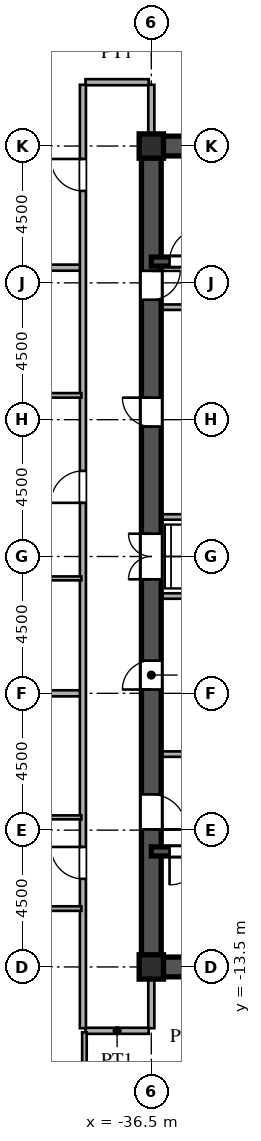
"""IFC4 building model, lengths in metres.
Left out: names, types, materials, properties, quantities, classifications, styles, units other than length and angle.
Written with IfcOpenShell. Run it as: python <this file> out.ifc"""

import sys

from ifc_helpers import new_model, si_unit, direction, frame, frame_2d, origin, origin_2d, place, context, subcontext, project, spatial, rectangle, i_section, extrude, source, transform, mapped, element, fill, save


model = new_model("IFC4")
c1 = context("Model", 3, precision=1e-05, world=origin(), true_north=direction((0.0, 1.0)))
c2 = subcontext(c1, "Body", "Model", "MODEL_VIEW")
j1 = project(units=[si_unit("LENGTHUNIT", "METRE"), si_unit("PLANEANGLEUNIT", "RADIAN")], contexts=[c1])
p1 = place(None, origin())
s1 = spatial("IfcSite", under=j1, at=p1, CompositionType="ELEMENT")
p2 = place(p1, origin())
s2 = spatial("IfcBuilding", under=s1, at=p2, CompositionType="ELEMENT")
p3 = place(p2, frame((0.0, 0.0, 65.7)))
s3 = spatial("IfcBuildingStorey", under=s2, at=p3, CompositionType="ELEMENT", Elevation=65.7)
m1 = source(origin(), c2, "Body", "SweptSolid", [
    extrude(i_section(OverallWidth=0.8, OverallDepth=0.8, WebThickness=0.032, FlangeThickness=0.05, at=origin_2d()), origin(), (0.0, 0.0, 1.0), 3.6),
])
for number, where, z_axis, x_axis in (
    (1, (-36.5, -13.5, 0.0), (0.0, 0.0, 1.0), (1.0, 0.0, 0.0)),
    (2, (-36.5, 13.5, 0.0), (0.0, 0.0, 1.0), (1.0, 0.0, 0.0)),
):
    element("IfcColumn", number, at=place(p3, frame(where, z_axis=z_axis, x_axis=x_axis)), inside=s3, PredefinedType="COLUMN", context=c2, shape_type="MappedRepresentation", body=[
        mapped(m1, transform((0.0, 0.0, 0.0), scale=1.0)),
    ])
for number, where, z_axis, x_axis in (
    (3, (-36.5, -13.5, 0.0), (0.0, 0.0, 1.0), (1.0, 0.0, 0.0)),
    (4, (-36.5, 13.5, 0.0), (0.0, 0.0, 1.0), (1.0, 0.0, 0.0)),
):
    element("IfcWall", number, at=place(p3, frame(where, z_axis=z_axis, x_axis=x_axis)), inside=s3, PredefinedType="SHEAR", context=c2, shape_type="SweptSolid", body=[
        extrude(rectangle(XDim=9.0, YDim=0.65, at=frame_2d((4.5, 0.0))), origin(), (0.0, 0.0, 1.0), 3.38),
    ])
p4 = place(p3, frame((-36.5, -13.65, 0.0), z_axis=(0.0, 0.0, 1.0), x_axis=(0.0, 1.0, 0.0)))
e5 = element("IfcWall", 5, at=p4, inside=s3, PredefinedType="SHEAR", context=c2, shape_type="SweptSolid", body=[
    extrude(rectangle(XDim=7.15, YDim=0.65, at=frame_2d((3.575, 0.0))), origin(), (0.0, 0.0, 1.0), 3.38),
])
p5 = place(p4, frame((4.675, 0.0, 0.0)))
e6 = element("IfcOpeningElement", 6, at=p5, cuts=e5, PredefinedType="OPENING", context=c2, shape_type="SweptSolid", body=[
    extrude(rectangle(XDim=1.15, YDim=2.2, at=frame_2d((0.575, 1.1))), frame((0.0, 0.335, 0.0), z_axis=(0.0, -1.0, 0.0), x_axis=(1.0, 0.0, 0.0)), (0.0, 0.0, 1.0), 0.67),
])
p6 = place(p3, frame((-36.5, -1.3, 0.0), z_axis=(0.0, 0.0, 1.0), x_axis=(0.0, 1.0, 0.0)))
e7 = element("IfcWall", 7, at=p6, inside=s3, PredefinedType="SHEAR", context=c2, shape_type="SweptSolid", body=[
    extrude(rectangle(XDim=2.6, YDim=0.65, at=frame_2d((1.3, 0.0))), origin(), (0.0, 0.0, 1.0), 3.38),
])
p7 = place(p6, frame((0.55, 0.0, 0.0)))
e8 = element("IfcOpeningElement", 8, at=p7, cuts=e7, PredefinedType="OPENING", context=c2, shape_type="SweptSolid", body=[
    extrude(rectangle(XDim=1.5, YDim=2.3, at=frame_2d((0.75, 1.15))), frame((0.0, 0.335, 0.0), z_axis=(0.0, -1.0, 0.0), x_axis=(1.0, 0.0, 0.0)), (0.0, 0.0, 1.0), 0.67),
])
p8 = place(p3, frame((-36.5, 8.2, 0.0), z_axis=(0.0, 0.0, 1.0), x_axis=(0.0, 1.0, 0.0)))
e9 = element("IfcWall", 9, at=p8, inside=s3, PredefinedType="SHEAR", context=c2, shape_type="SweptSolid", body=[
    extrude(rectangle(XDim=5.45, YDim=0.65, at=frame_2d((2.725, 0.0))), origin(), (0.0, 0.0, 1.0), 3.38),
])
p9 = place(p8, frame((0.245, 0.0, 0.0)))
e10 = element("IfcOpeningElement", 10, at=p9, cuts=e9, PredefinedType="OPENING", context=c2, shape_type="SweptSolid", body=[
    extrude(rectangle(XDim=0.95, YDim=2.15, at=frame_2d((0.475, 1.075))), frame((0.0, 0.335, 0.0), z_axis=(0.0, -1.0, 0.0), x_axis=(1.0, 0.0, 0.0)), (0.0, 0.0, 1.0), 0.67),
])
p10 = place(p3, frame((-36.5, -6.5, 0.0), z_axis=(0.0, 0.0, 1.0), x_axis=(0.0, 1.0, 0.0)))
e11 = element("IfcWall", 11, at=p10, inside=s3, PredefinedType="SHEAR", context=c2, shape_type="SweptSolid", body=[
    extrude(rectangle(XDim=5.2, YDim=0.65, at=frame_2d((2.6, 0.0))), origin(), (0.0, 0.0, 1.0), 3.38),
])
p11 = place(p10, frame((2.125, 0.0, 0.0)))
e12 = element("IfcOpeningElement", 12, at=p11, cuts=e11, PredefinedType="OPENING", context=c2, shape_type="SweptSolid", body=[
    extrude(rectangle(XDim=0.95, YDim=2.15, at=frame_2d((0.475, 1.075))), frame((0.0, 0.335, 0.0), z_axis=(0.0, -1.0, 0.0), x_axis=(1.0, 0.0, 0.0)), (0.0, 0.0, 1.0), 0.67),
])
p12 = place(p3, frame((-36.5, 1.3, 0.0), z_axis=(0.0, 0.0, 1.0), x_axis=(0.0, 1.0, 0.0)))
e13 = element("IfcWall", 13, at=p12, inside=s3, PredefinedType="SHEAR", context=c2, shape_type="SweptSolid", body=[
    extrude(rectangle(XDim=6.9, YDim=0.65, at=frame_2d((3.45, 0.0))), origin(), (0.0, 0.0, 1.0), 3.38),
])
p13 = place(p12, frame((2.975, 0.0, 0.0)))
e14 = element("IfcOpeningElement", 14, at=p13, cuts=e13, PredefinedType="OPENING", context=c2, shape_type="SweptSolid", body=[
    extrude(rectangle(XDim=0.95, YDim=2.15, at=frame_2d((0.475, 1.075))), frame((0.0, 0.335, 0.0), z_axis=(0.0, -1.0, 0.0), x_axis=(1.0, 0.0, 0.0)), (0.0, 0.0, 1.0), 0.67),
])
p14 = place(p3, frame((-36.5, -9.7, 0.0), z_axis=(0.0, 0.0, 1.0), x_axis=(1.0, 0.0, 0.0)))
e15 = element("IfcWall", 15, at=p14, inside=s3, PredefinedType="SHEAR", context=c2, shape_type="SweptSolid", body=[
    extrude(rectangle(XDim=9.0, YDim=0.3, at=frame_2d((4.5, 0.0))), origin(), (0.0, 0.0, 1.0), 3.38),
])
p15 = place(p14, frame((0.6, 0.0, 0.0)))
e16 = element("IfcOpeningElement", 16, at=p15, cuts=e15, PredefinedType="OPENING", context=c2, shape_type="SweptSolid", body=[
    extrude(rectangle(XDim=1.1, YDim=2.2, at=frame_2d((0.55, 1.1))), frame((0.0, 0.16, 0.0), z_axis=(0.0, -1.0, 0.0), x_axis=(1.0, 0.0, 0.0)), (0.0, 0.0, 1.0), 0.32),
])
p16 = place(p3, frame((-36.5, 9.7, 0.0), z_axis=(0.0, 0.0, 1.0), x_axis=(1.0, 0.0, 0.0)))
e17 = element("IfcWall", 17, at=p16, inside=s3, PredefinedType="SHEAR", context=c2, shape_type="SweptSolid", body=[
    extrude(rectangle(XDim=9.0, YDim=0.3, at=frame_2d((4.5, 0.0))), origin(), (0.0, 0.0, 1.0), 3.38),
])
p17 = place(p16, frame((0.6, 0.0, 0.0)))
e18 = element("IfcOpeningElement", 18, at=p17, cuts=e17, PredefinedType="OPENING", context=c2, shape_type="SweptSolid", body=[
    extrude(rectangle(XDim=1.1, YDim=2.2, at=frame_2d((0.55, 1.1))), frame((0.0, 0.16, 0.0), z_axis=(0.0, -1.0, 0.0), x_axis=(1.0, 0.0, 0.0)), (0.0, 0.0, 1.0), 0.32),
])
for number, where, z_axis, x_axis in (
    (19, (-36.15, -6.5, 0.0), (0.0, 0.0, 1.0), (1.0, 0.0, 0.0)),
    (20, (-36.15, 8.2, 0.0), (0.0, 0.0, 1.0), (1.0, 0.0, 0.0)),
):
    element("IfcWall", number, at=place(p3, frame(where, z_axis=z_axis, x_axis=x_axis)), inside=s3, PredefinedType="PARTITIONING", context=c2, shape_type="SweptSolid", body=[
        extrude(rectangle(XDim=5.7, YDim=0.18, at=frame_2d((2.85, 0.0))), origin(), (0.0, 0.0, 1.0), 3.38),
    ])
for number, where, z_axis, x_axis in (
    (21, (-36.15, -1.3, 0.0), (0.0, 0.0, 1.0), (1.0, 0.0, 0.0)),
    (22, (-36.15, 1.3, 0.0), (0.0, 0.0, 1.0), (1.0, 0.0, 0.0)),
):
    element("IfcWall", number, at=place(p3, frame(where, z_axis=z_axis, x_axis=x_axis)), inside=s3, PredefinedType="PARTITIONING", context=c2, shape_type="SweptSolid", body=[
        extrude(rectangle(XDim=2.95, YDim=0.18, at=frame_2d((1.475, 0.0))), origin(), (0.0, 0.0, 1.0), 3.38),
    ])
p18 = place(p3, frame((-38.665, -15.6, 0.0), z_axis=(0.0, 0.0, 1.0), x_axis=(1.0, 0.0, 0.0)))
e23 = element("IfcWall", 23, at=p18, inside=s3, PredefinedType="PARTITIONING", context=c2, shape_type="SweptSolid", body=[
    extrude(rectangle(XDim=2.08, YDim=0.2, at=frame_2d((1.04, 0.0))), origin(), (0.0, 0.0, 1.0), 3.38),
])
p19 = place(p3, frame((-43.8, -11.58, 0.0), z_axis=(0.0, 0.0, 1.0), x_axis=(1.0, 0.0, 0.0)))
e24 = element("IfcWall", 24, at=p19, inside=s3, PredefinedType="PARTITIONING", context=c2, shape_type="SweptSolid", body=[
    extrude(rectangle(XDim=5.0, YDim=0.15, at=frame_2d((2.5, 0.0))), origin(), (0.0, 0.0, 1.0), 3.38),
])
p20 = place(p19, frame((2.025, 0.0, 0.0)))
e25 = element("IfcOpeningElement", 25, at=p20, cuts=e24, PredefinedType="OPENING", context=c2, shape_type="SweptSolid", body=[
    extrude(rectangle(XDim=0.95, YDim=2.15, at=frame_2d((0.475, 1.075))), frame((0.0, 0.085, 0.0), z_axis=(0.0, -1.0, 0.0), x_axis=(1.0, 0.0, 0.0)), (0.0, 0.0, 1.0), 0.17),
])
p21 = place(p3, frame((-43.8, -8.58, 0.0), z_axis=(0.0, 0.0, 1.0), x_axis=(1.0, 0.0, 0.0)))
e26 = element("IfcWall", 26, at=p21, inside=s3, PredefinedType="PARTITIONING", context=c2, shape_type="SweptSolid", body=[
    extrude(rectangle(XDim=5.0, YDim=0.13, at=frame_2d((2.5, 0.0))), origin(), (0.0, 0.0, 1.0), 3.38),
])
p22 = place(p21, frame((2.06, 0.0, 0.0)))
e27 = element("IfcOpeningElement", 27, at=p22, cuts=e26, PredefinedType="OPENING", context=c2, shape_type="SweptSolid", body=[
    extrude(rectangle(XDim=0.88, YDim=2.1, at=frame_2d((0.44, 1.05))), frame((0.0, 0.075, 0.0), z_axis=(0.0, -1.0, 0.0), x_axis=(1.0, 0.0, 0.0)), (0.0, 0.0, 1.0), 0.15),
])
p23 = place(p3, frame((-54.52, -4.5, 0.0), z_axis=(0.0, 0.0, 1.0), x_axis=(1.0, 0.0, 0.0)))
e28 = element("IfcWall", 28, at=p23, inside=s3, PredefinedType="PARTITIONING", context=c2, shape_type="SweptSolid", body=[
    extrude(rectangle(XDim=15.69, YDim=0.2, at=frame_2d((7.845, 0.0))), origin(), (0.0, 0.0, 1.0), 2.68),
])
p24 = place(p3, frame((-43.8, -0.72, 0.0), z_axis=(0.0, 0.0, 1.0), x_axis=(1.0, 0.0, 0.0)))
e29 = element("IfcWall", 29, at=p24, inside=s3, PredefinedType="PARTITIONING", context=c2, shape_type="SweptSolid", body=[
    extrude(rectangle(XDim=5.0, YDim=0.13, at=frame_2d((2.5, 0.0))), origin(), (0.0, 0.0, 1.0), 3.38),
])
p25 = place(p24, frame((2.06, 0.0, 0.0)))
e30 = element("IfcOpeningElement", 30, at=p25, cuts=e29, PredefinedType="OPENING", context=c2, shape_type="SweptSolid", body=[
    extrude(rectangle(XDim=0.88, YDim=2.1, at=frame_2d((0.44, 1.05))), frame((0.0, 0.075, 0.0), z_axis=(0.0, -1.0, 0.0), x_axis=(1.0, 0.0, 0.0)), (0.0, 0.0, 1.0), 0.15),
])
p26 = place(p3, frame((-43.8, 5.3, 0.0), z_axis=(0.0, 0.0, 1.0), x_axis=(1.0, 0.0, 0.0)))
e31 = element("IfcWall", 31, at=p26, inside=s3, PredefinedType="PARTITIONING", context=c2, shape_type="SweptSolid", body=[
    extrude(rectangle(XDim=5.0, YDim=0.15, at=frame_2d((2.5, 0.0))), origin(), (0.0, 0.0, 1.0), 3.38),
])
p27 = place(p26, frame((2.025, 0.0, 0.0)))
e32 = element("IfcOpeningElement", 32, at=p27, cuts=e31, PredefinedType="OPENING", context=c2, shape_type="SweptSolid", body=[
    extrude(rectangle(XDim=0.95, YDim=2.15, at=frame_2d((0.475, 1.075))), frame((0.0, 0.085, 0.0), z_axis=(0.0, -1.0, 0.0), x_axis=(1.0, 0.0, 0.0)), (0.0, 0.0, 1.0), 0.17),
])
p28 = place(p3, frame((-66.568, 9.5, 0.0), z_axis=(0.0, 0.0, 1.0), x_axis=(1.0, 0.0, 0.0)))
e33 = element("IfcWall", 33, at=p28, inside=s3, PredefinedType="PARTITIONING", context=c2, shape_type="SweptSolid", body=[
    extrude(rectangle(XDim=27.738, YDim=0.2, at=frame_2d((13.869, 0.0))), origin(), (0.0, 0.0, 1.0), 3.38),
])
p29 = place(p3, frame((-38.665, 15.6, 0.0), z_axis=(0.0, 0.0, 1.0), x_axis=(1.0, 0.0, 0.0)))
e34 = element("IfcWall", 34, at=p29, inside=s3, PredefinedType="PARTITIONING", context=c2, shape_type="SweptSolid", body=[
    extrude(rectangle(XDim=2.08, YDim=0.2, at=frame_2d((1.04, 0.0))), origin(), (0.0, 0.0, 1.0), 3.38),
])
p30 = place(p3, frame((-38.75, -15.515, 0.0), z_axis=(0.0, 0.0, 1.0), x_axis=(0.0, 1.0, 0.0)))
e35 = element("IfcWall", 35, at=p30, inside=s3, PredefinedType="PARTITIONING", context=c2, shape_type="SweptSolid", body=[
    extrude(rectangle(XDim=31.03, YDim=0.2, at=frame_2d((15.515, 0.0))), origin(), (0.0, 0.0, 1.0), 3.38),
])
p31 = place(p30, frame((4.913, 0.0, 0.0)))
e36 = element("IfcOpeningElement", 36, at=p31, cuts=e35, PredefinedType="OPENING", context=c2, shape_type="SweptSolid", body=[
    extrude(rectangle(XDim=1.05, YDim=2.25, at=frame_2d((0.525, 1.125))), frame((0.0, 0.11, 0.0), z_axis=(0.0, -1.0, 0.0), x_axis=(1.0, 0.0, 0.0)), (0.0, 0.0, 1.0), 0.22),
])
p32 = place(p30, frame((17.28, 0.0, 0.0)))
e37 = element("IfcOpeningElement", 37, at=p32, cuts=e35, PredefinedType="OPENING", context=c2, shape_type="SweptSolid", body=[
    extrude(rectangle(XDim=1.05, YDim=2.25, at=frame_2d((0.525, 1.125))), frame((0.0, 0.11, 0.0), z_axis=(0.0, -1.0, 0.0), x_axis=(1.0, 0.0, 0.0)), (0.0, 0.0, 1.0), 0.22),
])
p33 = place(p30, frame((27.54, 0.0, 0.0)))
e38 = element("IfcOpeningElement", 38, at=p33, cuts=e35, PredefinedType="OPENING", context=c2, shape_type="SweptSolid", body=[
    extrude(rectangle(XDim=1.05, YDim=2.25, at=frame_2d((0.525, 1.125))), frame((0.0, 0.11, 0.0), z_axis=(0.0, -1.0, 0.0), x_axis=(1.0, 0.0, 0.0)), (0.0, 0.0, 1.0), 0.22),
])
p34 = place(p3, frame((-38.7, -22.07, 0.0), z_axis=(0.0, 0.0, 1.0), x_axis=(0.0, 1.0, 0.0)))
e39 = element("IfcWall", 39, at=p34, inside=s3, PredefinedType="PARTITIONING", context=c2, shape_type="SweptSolid", body=[
    extrude(rectangle(XDim=6.42, YDim=0.15, at=frame_2d((3.21, 0.0))), origin(), (0.0, 0.0, 1.0), 3.38),
])
p35 = place(p34, frame((0.827, 0.0, 0.0)))
e40 = element("IfcOpeningElement", 40, at=p35, cuts=e39, PredefinedType="OPENING", context=c2, shape_type="SweptSolid", body=[
    extrude(rectangle(XDim=0.95, YDim=2.15, at=frame_2d((0.475, 1.075))), frame((0.0, 0.085, 0.0), z_axis=(0.0, -1.0, 0.0), x_axis=(1.0, 0.0, 0.0)), (0.0, 0.0, 1.0), 0.17),
])
for number, where, z_axis, x_axis in (
    (41, (-36.5, -15.515, 0.0), (0.0, 0.0, 1.0), (0.0, 1.0, 0.0)),
    (42, (-36.5, 13.83, 0.0), (0.0, 0.0, 1.0), (0.0, 1.0, 0.0)),
):
    element("IfcWall", number, at=place(p3, frame(where, z_axis=z_axis, x_axis=x_axis)), inside=s3, PredefinedType="PARTITIONING", context=c2, shape_type="SweptSolid", body=[
        extrude(rectangle(XDim=1.685, YDim=0.2, at=frame_2d((0.842, 0.0))), origin(), (0.0, 0.0, 1.0), 2.68),
    ])
m2 = source(origin(), c2, "Body", "SweptSolid", [
    extrude(rectangle(XDim=1.15, YDim=2.2, at=frame_2d((0.575, 1.1))), frame((0.0, 0.025, 0.0), z_axis=(0.0, -1.0, 0.0), x_axis=(1.0, 0.0, 0.0)), (0.0, 0.0, 1.0), 0.05),
])
p36 = place(p5, frame((1.15, 0.0, 0.0), z_axis=(0.0, 0.0, 1.0), x_axis=(-1.0, 0.0, 0.0)))
e43 = element("IfcDoor", 43, at=p36, inside=s3, OperationType="SINGLE_SWING_LEFT", PredefinedType="DOOR", context=c2, shape_type="MappedRepresentation", body=[
    mapped(m2, transform((0.0, 0.0, 0.0), scale=1.0)),
])
fill(e6, e43)
m3 = source(origin(), c2, "Body", "SweptSolid", [
    extrude(rectangle(XDim=1.5, YDim=2.3, at=frame_2d((0.75, 1.15))), frame((0.0, 0.025, 0.0), z_axis=(0.0, -1.0, 0.0), x_axis=(1.0, 0.0, 0.0)), (0.0, 0.0, 1.0), 0.05),
])
p37 = place(p7, origin())
e44 = element("IfcDoor", 44, at=p37, inside=s3, OperationType="DOUBLE_SWING_LEFT", PredefinedType="DOOR", context=c2, shape_type="MappedRepresentation", body=[
    mapped(m3, transform((0.0, 0.0, 0.0), scale=1.0)),
])
fill(e8, e44)
m4 = source(origin(), c2, "Body", "SweptSolid", [
    extrude(rectangle(XDim=0.95, YDim=2.15, at=frame_2d((0.475, 1.075))), frame((0.0, 0.025, 0.0), z_axis=(0.0, -1.0, 0.0), x_axis=(1.0, 0.0, 0.0)), (0.0, 0.0, 1.0), 0.05),
])
p38 = place(p9, frame((0.95, 0.0, 0.0), z_axis=(0.0, 0.0, 1.0), x_axis=(-1.0, 0.0, 0.0)))
e45 = element("IfcDoor", 45, at=p38, inside=s3, OperationType="SINGLE_SWING_RIGHT", PredefinedType="DOOR", context=c2, shape_type="MappedRepresentation", body=[
    mapped(m4, transform((0.0, 0.0, 0.0), scale=1.0)),
])
fill(e10, e45)
p39 = place(p11, origin())
e46 = element("IfcDoor", 46, at=p39, inside=s3, OperationType="SINGLE_SWING_LEFT", PredefinedType="DOOR", context=c2, shape_type="MappedRepresentation", body=[
    mapped(m4, transform((0.0, 0.0, 0.0), scale=1.0)),
])
fill(e12, e46)
p40 = place(p13, origin())
e47 = element("IfcDoor", 47, at=p40, inside=s3, OperationType="SINGLE_SWING_RIGHT", PredefinedType="DOOR", context=c2, shape_type="MappedRepresentation", body=[
    mapped(m4, transform((0.0, 0.0, 0.0), scale=1.0)),
])
fill(e14, e47)
m5 = source(origin(), c2, "Body", "SweptSolid", [
    extrude(rectangle(XDim=1.1, YDim=2.2, at=frame_2d((0.55, 1.1))), frame((0.0, 0.025, 0.0), z_axis=(0.0, -1.0, 0.0), x_axis=(1.0, 0.0, 0.0)), (0.0, 0.0, 1.0), 0.05),
])
p41 = place(p15, frame((1.1, 0.0, 0.0), z_axis=(0.0, 0.0, 1.0), x_axis=(-1.0, 0.0, 0.0)))
e48 = element("IfcDoor", 48, at=p41, inside=s3, OperationType="SINGLE_SWING_LEFT", PredefinedType="DOOR", context=c2, shape_type="MappedRepresentation", body=[
    mapped(m5, transform((0.0, 0.0, 0.0), scale=1.0)),
])
fill(e16, e48)
p42 = place(p17, origin())
e49 = element("IfcDoor", 49, at=p42, inside=s3, OperationType="SINGLE_SWING_RIGHT", PredefinedType="DOOR", context=c2, shape_type="MappedRepresentation", body=[
    mapped(m5, transform((0.0, 0.0, 0.0), scale=1.0)),
])
fill(e18, e49)
m6 = source(origin(), c2, "Body", "SweptSolid", [
    extrude(rectangle(XDim=1.05, YDim=2.25, at=frame_2d((0.525, 1.125))), frame((0.0, 0.025, 0.0), z_axis=(0.0, -1.0, 0.0), x_axis=(1.0, 0.0, 0.0)), (0.0, 0.0, 1.0), 0.05),
])
p43 = place(p31, origin())
e50 = element("IfcDoor", 50, at=p43, inside=s3, OperationType="SINGLE_SWING_RIGHT", PredefinedType="DOOR", context=c2, shape_type="MappedRepresentation", body=[
    mapped(m6, transform((0.0, 0.0, 0.0), scale=1.0)),
])
fill(e36, e50)
p44 = place(p32, origin())
e51 = element("IfcDoor", 51, at=p44, inside=s3, OperationType="SINGLE_SWING_LEFT", PredefinedType="DOOR", context=c2, shape_type="MappedRepresentation", body=[
    mapped(m6, transform((0.0, 0.0, 0.0), scale=1.0)),
])
fill(e37, e51)
p45 = place(p33, origin())
e52 = element("IfcDoor", 52, at=p45, inside=s3, OperationType="SINGLE_SWING_RIGHT", PredefinedType="DOOR", context=c2, shape_type="MappedRepresentation", body=[
    mapped(m6, transform((0.0, 0.0, 0.0), scale=1.0)),
])
fill(e38, e52)
save(model, sys.argv[1])
